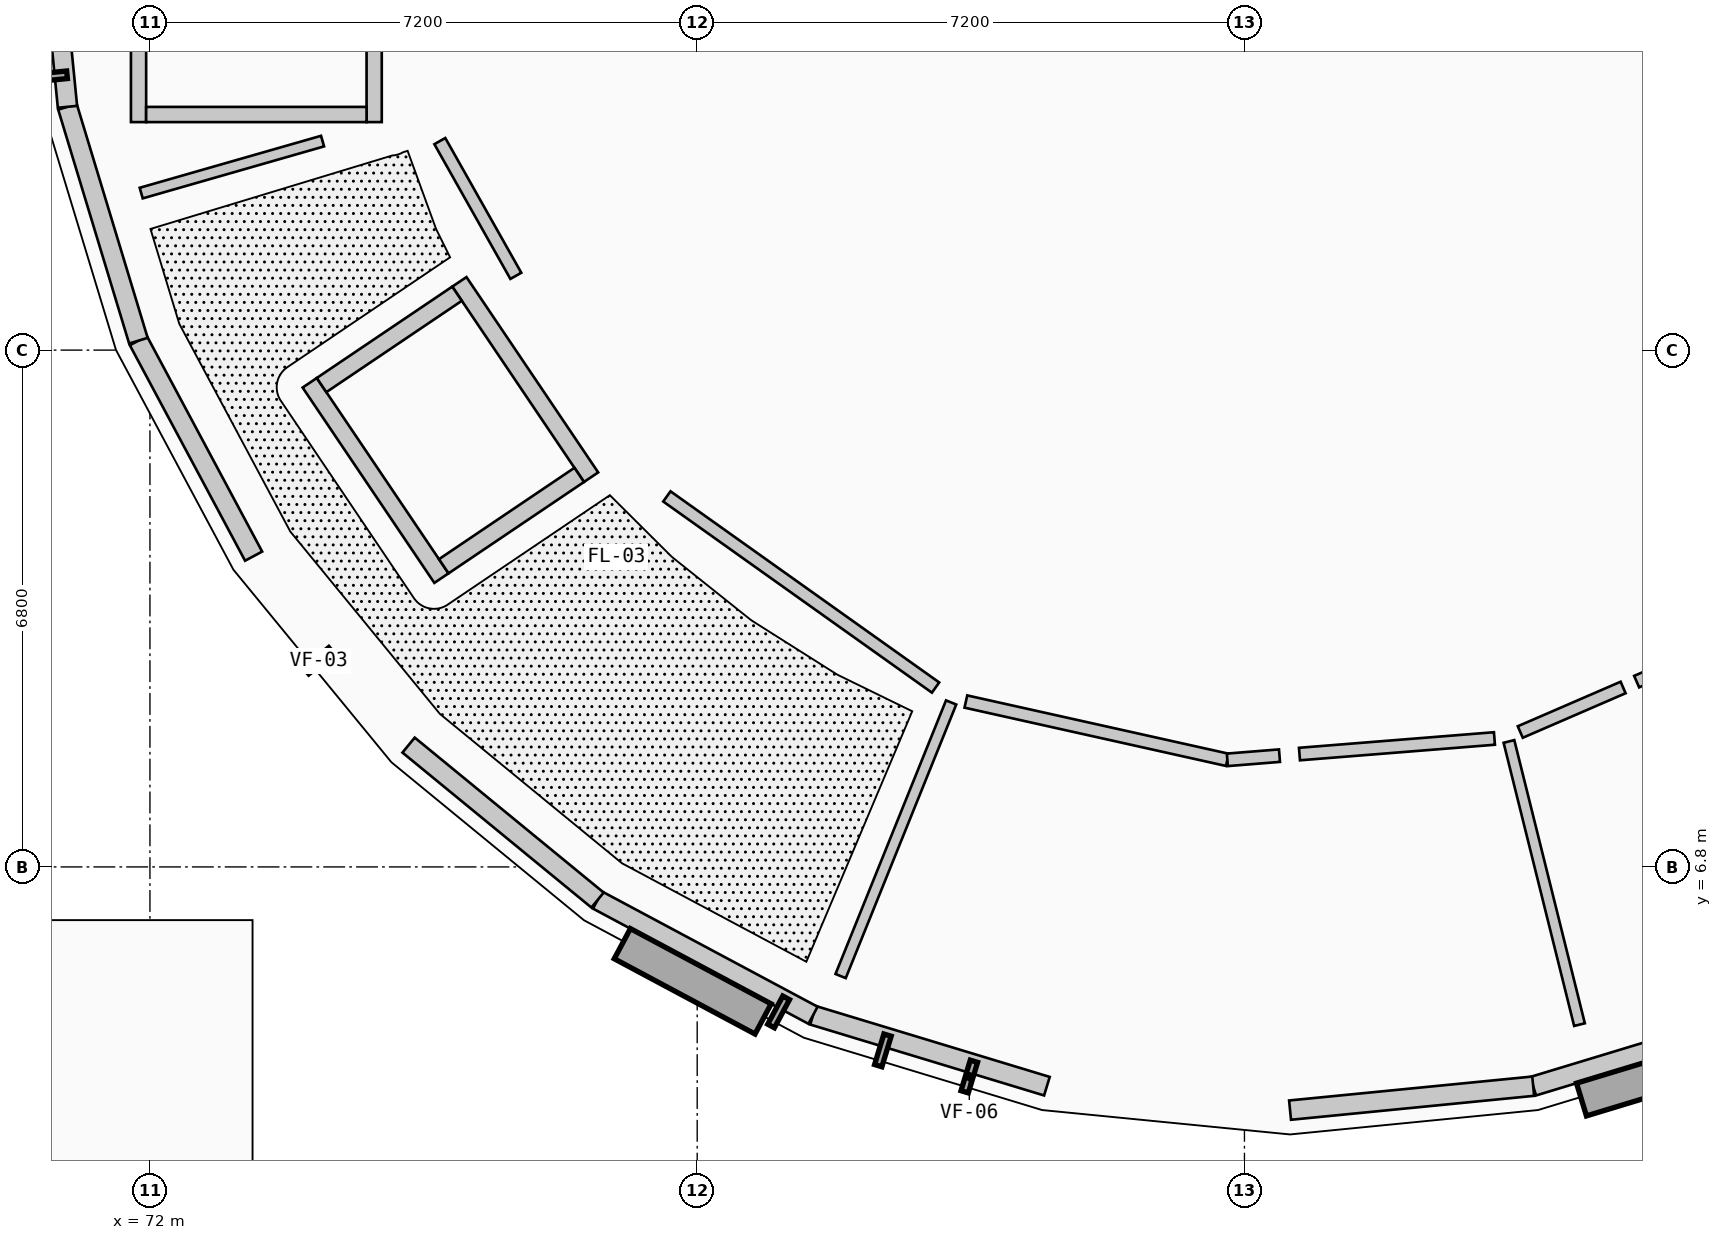
"""IFC4 building model, lengths in metres.
Left out: names, types, materials, properties, quantities, classifications, styles, units other than length and angle.
Written with IfcOpenShell. Run it as: python <this file> out.ifc"""

import sys

from ifc_helpers import new_model, si_unit, direction, frame, frame_2d, origin, origin_2d, place, context, subcontext, project, spatial, rectangle, circle, extrude, element, fill, save


model = new_model("IFC4")
c1 = context("Model", 3, precision=1e-05, world=origin(), true_north=direction((0.0, 1.0)))
c2 = subcontext(c1, "Body", "Model", "MODEL_VIEW")
j1 = project(units=[si_unit("LENGTHUNIT", "METRE"), si_unit("PLANEANGLEUNIT", "RADIAN")], contexts=[c1])
p1 = place(None, origin())
s1 = spatial("IfcSite", under=j1, at=p1, CompositionType="ELEMENT")
p2 = place(p1, origin())
s2 = spatial("IfcBuilding", under=s1, at=p2, CompositionType="ELEMENT")
p3 = place(p2, frame((0.0, 0.0, 4.55)))
s3 = spatial("IfcBuildingStorey", under=s2, at=p3, CompositionType="ELEMENT", Elevation=4.55)
for number, where, z_axis, x_axis in (
    (1, (72.329, 13.923, 0.0), (0.0, 0.0, 1.0), (1.0, 0.0, 0.0)),
    (2, (75.771, 8.771, 0.0), (0.0, 0.0, 1.0), (1.0, 0.0, 0.0)),
    (3, (80.923, 5.329, 0.0), (0.0, 0.0, 1.0), (1.0, 0.0, 0.0)),
    (4, (87.0, 4.12, 0.0), (0.0, 0.0, 1.0), (1.0, 0.0, 0.0)),
    (5, (76.08, 15.477, 0.0), (0.0, 0.0, 1.0), (1.0, 0.0, 0.0)),
    (6, (78.642, 11.642, 0.0), (0.0, 0.0, 1.0), (1.0, 0.0, 0.0)),
    (7, (82.477, 9.08, 0.0), (0.0, 0.0, 1.0), (1.0, 0.0, 0.0)),
    (8, (87.0, 8.18, 0.0), (0.0, 0.0, 1.0), (1.0, 0.0, 0.0)),
    (9, (91.523, 9.08, 0.0), (0.0, 0.0, 1.0), (1.0, 0.0, 0.0)),
):
    element("IfcColumn", number, at=place(p3, frame(where, z_axis=z_axis, x_axis=x_axis)), inside=s3, PredefinedType="COLUMN", context=c2, shape_type="SweptSolid", body=[
        extrude(rectangle(XDim=0.315, YDim=0.315, at=origin_2d()), origin(), (0.0, 0.0, 1.0), 4.2),
    ])
for number, where, z_axis, x_axis in (
    (10, (75.0, 3.25, 0.0), (0.0, 0.0, 1.0), (1.0, 0.0, 0.0)),
    (11, (79.8, 3.25, 0.0), (0.0, 0.0, 1.0), (1.0, 0.0, 0.0)),
    (12, (84.6, 3.25, 0.0), (0.0, 0.0, 1.0), (1.0, 0.0, 0.0)),
    (13, (89.4, 3.25, 0.0), (0.0, 0.0, 1.0), (1.0, 0.0, 0.0)),
):
    element("IfcColumn", number, at=place(p3, frame(where, z_axis=z_axis, x_axis=x_axis)), inside=s3, PredefinedType="COLUMN", context=c2, shape_type="SweptSolid", body=[
        extrude(circle(Radius=0.35, at=origin_2d()), origin(), (0.0, 0.0, 1.0), 4.2),
    ])
p4 = place(p3, frame((72.9, 5.65, 0.0), z_axis=(0.0, 0.0, 1.0), x_axis=(1.0, 0.0, 0.0)))
e14 = element("IfcColumn", 14, at=p4, inside=s3, PredefinedType="PILASTER", context=c2, shape_type="SweptSolid", body=[
    extrude(circle(Radius=0.275, at=origin_2d()), origin(), (0.0, 0.0, 1.0), 2.4),
])
p5 = place(p3, frame((74.166, 7.166, 0.0), z_axis=(0.0, 0.0, 1.0), x_axis=(1.0, 0.0, 0.0)))
e15 = element("IfcColumn", 15, at=p5, inside=s3, PredefinedType="COLUMN", context=c2, shape_type="SweptSolid", body=[
    extrude(circle(Radius=0.35, at=origin_2d()), origin(), (0.0, 0.0, 1.0), 4.2),
])
p6 = place(p3, frame((93.276, 4.848, 0.0), z_axis=(0.0, 0.0, 1.0), x_axis=(-0.956984161567, -0.29014016356, 0.0)))
e16 = element("IfcWall", 16, at=p6, inside=s3, PredefinedType="ELEMENTEDWALL", context=c2, shape_type="SweptSolid", body=[
    extrude(rectangle(XDim=3.215, YDim=0.255, at=frame_2d((1.607, 0.0))), origin(), (0.0, 0.0, 1.0), 3.314),
])
p7 = place(p6, frame((1.158, 0.0, 0.85)))
e17 = element("IfcOpeningElement", 17, at=p7, cuts=e16, PredefinedType="OPENING", context=c2, shape_type="SweptSolid", body=[
    extrude(rectangle(XDim=0.9, YDim=1.4, at=frame_2d((0.45, 0.7))), frame((0.0, 0.137, 0.0), z_axis=(0.0, -1.0, 0.0), x_axis=(1.0, 0.0, 0.0)), (0.0, 0.0, 1.0), 0.275),
])
p8 = place(p3, frame((90.199, 3.915, 0.0), z_axis=(0.0, 0.0, 1.0), x_axis=(-0.995188673637, -0.097977057849, 0.0)))
e18 = element("IfcWall", 18, at=p8, inside=s3, PredefinedType="ELEMENTEDWALL", context=c2, shape_type="SweptSolid", body=[
    extrude(rectangle(XDim=3.214, YDim=0.255, at=frame_2d((1.607, 0.0))), origin(), (0.0, 0.0, 1.0), 3.314),
])
p9 = place(p3, frame((83.801, 3.915, 0.0), z_axis=(0.0, 0.0, 1.0), x_axis=(-0.956984161567, 0.29014016356, 0.0)))
e19 = element("IfcWall", 19, at=p9, inside=s3, PredefinedType="ELEMENTEDWALL", context=c2, shape_type="SweptSolid", body=[
    extrude(rectangle(XDim=3.215, YDim=0.255, at=frame_2d((1.607, 0.0))), origin(), (0.0, 0.0, 1.0), 3.314),
])
p10 = place(p9, frame((1.158, 0.0, 0.85)))
e20 = element("IfcOpeningElement", 20, at=p10, cuts=e19, PredefinedType="OPENING", context=c2, shape_type="SweptSolid", body=[
    extrude(rectangle(XDim=0.9, YDim=1.65, at=frame_2d((0.45, 0.825))), frame((0.0, 0.137, 0.0), z_axis=(0.0, -1.0, 0.0), x_axis=(1.0, 0.0, 0.0)), (0.0, 0.0, 1.0), 0.275),
])
p11 = place(p3, frame((80.724, 4.848, 0.0), z_axis=(0.0, 0.0, 1.0), x_axis=(-0.881835313523, 0.47155750426, 0.0)))
e21 = element("IfcWall", 21, at=p11, inside=s3, PredefinedType="ELEMENTEDWALL", context=c2, shape_type="SweptSolid", body=[
    extrude(rectangle(XDim=3.215, YDim=0.255, at=frame_2d((1.607, 0.0))), origin(), (0.0, 0.0, 1.0), 3.314),
])
p12 = place(p11, frame((1.157, 0.0, 0.85)))
e22 = element("IfcOpeningElement", 22, at=p12, cuts=e21, PredefinedType="OPENING", context=c2, shape_type="SweptSolid", body=[
    extrude(rectangle(XDim=0.9, YDim=1.9, at=frame_2d((0.45, 0.95))), frame((0.0, 0.137, 0.0), z_axis=(0.0, -1.0, 0.0), x_axis=(1.0, 0.0, 0.0)), (0.0, 0.0, 1.0), 0.275),
])
p13 = place(p3, frame((77.889, 6.364, 0.0), z_axis=(0.0, 0.0, 1.0), x_axis=(-0.773165020866, 0.634204896314, 0.0)))
e23 = element("IfcWall", 23, at=p13, inside=s3, PredefinedType="ELEMENTEDWALL", context=c2, shape_type="SweptSolid", body=[
    extrude(rectangle(XDim=3.215, YDim=0.255, at=frame_2d((1.607, 0.0))), origin(), (0.0, 0.0, 1.0), 3.314),
])
p14 = place(p13, frame((1.148, 0.0, 0.85)))
e24 = element("IfcOpeningElement", 24, at=p14, cuts=e23, PredefinedType="OPENING", context=c2, shape_type="SweptSolid", body=[
    extrude(rectangle(XDim=0.92, YDim=1.55, at=frame_2d((0.46, 0.775))), frame((0.0, 0.137, 0.0), z_axis=(0.0, -1.0, 0.0), x_axis=(1.0, 0.0, 0.0)), (0.0, 0.0, 1.0), 0.275),
])
for number, where, z_axis, x_axis in (
    (25, (73.364, 10.889, 0.0), (0.0, 0.0, 1.0), (-0.472, 0.882, 0.0)),
    (26, (71.848, 13.724, 0.0), (0.0, 0.0, 1.0), (-0.29, 0.957, 0.0)),
):
    element("IfcWall", number, at=place(p3, frame(where, z_axis=z_axis, x_axis=x_axis)), inside=s3, PredefinedType="ELEMENTEDWALL", context=c2, shape_type="SweptSolid", body=[
        extrude(rectangle(XDim=3.215, YDim=0.255, at=frame_2d((1.607, 0.0))), origin(), (0.0, 0.0, 1.0), 3.314),
    ])
p15 = place(p3, frame((70.915, 16.801, 0.0), z_axis=(0.0, 0.0, 1.0), x_axis=(-0.097977057849, 0.995188673637, 0.0)))
e27 = element("IfcWall", 27, at=p15, inside=s3, PredefinedType="ELEMENTEDWALL", context=c2, shape_type="SweptSolid", body=[
    extrude(rectangle(XDim=3.214, YDim=0.255, at=frame_2d((1.607, 0.0))), origin(), (0.0, 0.0, 1.0), 3.314),
])
p16 = place(p3, frame((74.95, 16.6, 0.0), z_axis=(0.0, 0.0, 1.0), x_axis=(0.0, 1.0, 0.0)))
e28 = element("IfcWall", 28, at=p16, inside=s3, PredefinedType="SHEAR", context=c2, shape_type="SweptSolid", body=[
    extrude(rectangle(XDim=6.8, YDim=0.2, at=frame_2d((3.4, 0.0))), origin(), (0.0, 0.0, 1.0), 3.3),
])
p17 = place(p16, frame((0.38, 0.0, 0.0)))
e29 = element("IfcOpeningElement", 29, at=p17, cuts=e28, PredefinedType="OPENING", context=c2, shape_type="SweptSolid", body=[
    extrude(rectangle(XDim=1.1, YDim=2.15, at=frame_2d((0.55, 1.075))), frame((0.0, 0.11, 0.0), z_axis=(0.0, -1.0, 0.0), x_axis=(1.0, 0.0, 0.0)), (0.0, 0.0, 1.0), 0.22),
])
p18 = place(p3, frame((71.85, 16.6, 0.0), z_axis=(0.0, 0.0, 1.0), x_axis=(0.0, 1.0, 0.0)))
e30 = element("IfcWall", 30, at=p18, inside=s3, PredefinedType="SHEAR", context=c2, shape_type="SweptSolid", body=[
    extrude(rectangle(XDim=6.8, YDim=0.2, at=frame_2d((3.4, 0.0))), origin(), (0.0, 0.0, 1.0), 3.3),
])
p19 = place(p3, frame((74.85, 16.7, 0.0), z_axis=(0.0, 0.0, 1.0), x_axis=(-1.0, 0.0, 0.0)))
e31 = element("IfcWall", 31, at=p19, inside=s3, PredefinedType="SHEAR", context=c2, shape_type="SweptSolid", body=[
    extrude(rectangle(XDim=2.9, YDim=0.2, at=frame_2d((1.45, 0.0))), origin(), (0.0, 0.0, 1.0), 3.3),
])
p20 = place(p3, frame((77.804, 11.928, 0.0), z_axis=(0.0, 0.0, 1.0), x_axis=(-0.559054792443, 0.829130712883, 0.0)))
e32 = element("IfcWall", 32, at=p20, inside=s3, PredefinedType="SHEAR", context=c2, shape_type="SweptSolid", body=[
    extrude(rectangle(XDim=3.1, YDim=0.225, at=frame_2d((1.55, 0.0))), origin(), (0.0, 0.0, 1.0), 3.3),
])
p21 = place(p20, frame((0.9, 0.0, 0.0)))
e33 = element("IfcOpeningElement", 33, at=p21, cuts=e32, PredefinedType="OPENING", context=c2, shape_type="SweptSolid", body=[
    extrude(rectangle(XDim=1.3, YDim=2.2, at=frame_2d((0.65, 1.1))), frame((0.0, 0.123, 0.0), z_axis=(0.0, -1.0, 0.0), x_axis=(1.0, 0.0, 0.0)), (0.0, 0.0, 1.0), 0.245),
])
p22 = place(p3, frame((75.835, 10.6, 0.0), z_axis=(0.0, 0.0, 1.0), x_axis=(-0.559091302934, 0.829106093925, 0.0)))
e34 = element("IfcWall", 34, at=p22, inside=s3, PredefinedType="SHEAR", context=c2, shape_type="SweptSolid", body=[
    extrude(rectangle(XDim=3.1, YDim=0.225, at=frame_2d((1.55, 0.0))), origin(), (0.0, 0.0, 1.0), 3.3),
])
p23 = place(p3, frame((77.648, 11.958, 0.0), z_axis=(0.0, 0.0, 1.0), x_axis=(-0.829050086962, -0.559174349652, 0.0)))
e35 = element("IfcWall", 35, at=p23, inside=s3, PredefinedType="SHEAR", context=c2, shape_type="SweptSolid", body=[
    extrude(rectangle(XDim=2.149, YDim=0.225, at=frame_2d((1.075, 0.0))), origin(), (0.0, 0.0, 1.0), 3.3),
])
p24 = place(p3, frame((76.04, 14.342, 0.0), z_axis=(0.0, 0.0, 1.0), x_axis=(-0.828997430928, -0.559252411274, 0.0)))
e36 = element("IfcWall", 36, at=p24, inside=s3, PredefinedType="SHEAR", context=c2, shape_type="SweptSolid", body=[
    extrude(rectangle(XDim=2.15, YDim=0.225, at=frame_2d((1.075, 0.0))), origin(), (0.0, 0.0, 1.0), 3.3),
])
p25 = place(p3, frame((74.271, 16.35, 0.0), z_axis=(0.0, 0.0, 1.0), x_axis=(-0.96127114667, -0.275604395065, 0.0)))
e37 = element("IfcWall", 37, at=p25, inside=s3, PredefinedType="PARTITIONING", context=c2, shape_type="SweptSolid", body=[
    extrude(rectangle(XDim=2.482, YDim=0.145, at=frame_2d((1.241, 0.0))), origin(), (0.0, 0.0, 1.0), 3.3),
])
p26 = place(p3, frame((82.541, 8.964, 0.0), z_axis=(0.0, 0.0, 1.0), x_axis=(-0.374510873584, -0.927222522142, 0.0)))
e38 = element("IfcWall", 38, at=p26, inside=s3, PredefinedType="PARTITIONING", context=c2, shape_type="SweptSolid", body=[
    extrude(rectangle(XDim=3.883, YDim=0.145, at=frame_2d((1.941, 0.0))), origin(), (0.0, 0.0, 1.0), 3.3),
])
p27 = place(p3, frame((89.88, 8.451, 0.0), z_axis=(0.0, 0.0, 1.0), x_axis=(0.241742626418, -0.970340405514, 0.0)))
e39 = element("IfcWall", 39, at=p27, inside=s3, PredefinedType="PARTITIONING", context=c2, shape_type="SweptSolid", body=[
    extrude(rectangle(XDim=3.84, YDim=0.145, at=frame_2d((1.92, 0.0))), origin(), (0.0, 0.0, 1.0), 3.3),
])
p28 = place(p3, frame((75.814, 16.35, 0.0), z_axis=(0.0, 0.0, 1.0), x_axis=(0.491223208107, -0.871033730585, 0.0)))
e40 = element("IfcWall", 40, at=p28, inside=s3, PredefinedType="PARTITIONING", context=c2, shape_type="SweptSolid", body=[
    extrude(rectangle(XDim=2.036, YDim=0.165, at=frame_2d((1.018, 0.0))), origin(), (0.0, 0.0, 1.0), 3.3),
])
p29 = place(p3, frame((78.801, 11.675, 0.0), z_axis=(0.0, 0.0, 1.0), x_axis=(0.814800554092, -0.57974137083, 0.0)))
e41 = element("IfcWall", 41, at=p29, inside=s3, PredefinedType="PARTITIONING", context=c2, shape_type="SweptSolid", body=[
    extrude(rectangle(XDim=4.338, YDim=0.165, at=frame_2d((2.169, 0.0))), origin(), (0.0, 0.0, 1.0), 3.3),
])
p30 = place(p29, frame((1.599, 0.0, 0.0)))
e42 = element("IfcOpeningElement", 42, at=p30, cuts=e41, PredefinedType="OPENING", context=c2, shape_type="SweptSolid", body=[
    extrude(rectangle(XDim=1.14, YDim=2.28, at=frame_2d((0.57, 1.14))), frame((0.0, 0.093, 0.0), z_axis=(0.0, -1.0, 0.0), x_axis=(1.0, 0.0, 0.0)), (0.0, 0.0, 1.0), 0.185),
])
p31 = place(p3, frame((82.735, 8.976, 0.0), z_axis=(0.0, 0.0, 1.0), x_axis=(0.976027064995, -0.21764918653, 0.0)))
e43 = element("IfcWall", 43, at=p31, inside=s3, PredefinedType="PARTITIONING", context=c2, shape_type="SweptSolid", body=[
    extrude(rectangle(XDim=3.524, YDim=0.165, at=frame_2d((1.762, 0.0))), origin(), (0.0, 0.0, 1.0), 3.3),
])
p32 = place(p31, frame((1.132, 0.0, 0.0)))
e44 = element("IfcOpeningElement", 44, at=p32, cuts=e43, PredefinedType="OPENING", context=c2, shape_type="SweptSolid", body=[
    extrude(rectangle(XDim=1.26, YDim=2.28, at=frame_2d((0.63, 1.14))), frame((0.0, 0.093, 0.0), z_axis=(0.0, -1.0, 0.0), x_axis=(1.0, 0.0, 0.0)), (0.0, 0.0, 1.0), 0.185),
])
p33 = place(p3, frame((86.175, 8.209, 0.0), z_axis=(0.0, 0.0, 1.0), x_axis=(0.996809636353, 0.079815718213, 0.0)))
e45 = element("IfcWall", 45, at=p33, inside=s3, PredefinedType="PARTITIONING", context=c2, shape_type="SweptSolid", body=[
    extrude(rectangle(XDim=0.688, YDim=0.165, at=frame_2d((0.344, 0.0))), origin(), (0.0, 0.0, 1.0), 3.3),
])
p34 = place(p3, frame((87.124, 8.285, 0.0), z_axis=(0.0, 0.0, 1.0), x_axis=(0.996818897766, 0.079699968982, 0.0)))
e46 = element("IfcWall", 46, at=p34, inside=s3, PredefinedType="PARTITIONING", context=c2, shape_type="SweptSolid", body=[
    extrude(rectangle(XDim=2.573, YDim=0.165, at=frame_2d((1.287, 0.0))), origin(), (0.0, 0.0, 1.0), 3.3),
])
p35 = place(p3, frame((90.029, 8.575, 0.0), z_axis=(0.0, 0.0, 1.0), x_axis=(0.917648226471, 0.397393674401, 0.0)))
e47 = element("IfcWall", 47, at=p35, inside=s3, PredefinedType="PARTITIONING", context=c2, shape_type="SweptSolid", body=[
    extrude(rectangle(XDim=1.474, YDim=0.165, at=frame_2d((0.737, 0.0))), origin(), (0.0, 0.0, 1.0), 3.3),
])
p36 = place(p35, frame((0.282, 0.0, 0.0)))
e48 = element("IfcOpeningElement", 48, at=p36, cuts=e47, PredefinedType="OPENING", context=c2, shape_type="SweptSolid", body=[
    extrude(rectangle(XDim=0.91, YDim=2.15, at=frame_2d((0.455, 1.075))), frame((0.0, 0.093, 0.0), z_axis=(0.0, -1.0, 0.0), x_axis=(1.0, 0.0, 0.0)), (0.0, 0.0, 1.0), 0.185),
])
p37 = place(p3, frame((91.56, 9.238, 0.0), z_axis=(0.0, 0.0, 1.0), x_axis=(0.917614776026, 0.397470908142, 0.0)))
e49 = element("IfcWall", 49, at=p37, inside=s3, PredefinedType="PARTITIONING", context=c2, shape_type="SweptSolid", body=[
    extrude(rectangle(XDim=1.857, YDim=0.165, at=frame_2d((0.928, 0.0))), origin(), (0.0, 0.0, 1.0), 3.3),
])
p38 = place(p7, origin())
e50 = element("IfcWindow", 50, at=p38, inside=s3, PartitioningType="SINGLE_PANEL", PredefinedType="WINDOW", context=c2, shape_type="SweptSolid", body=[
    extrude(rectangle(XDim=0.9, YDim=1.4, at=frame_2d((0.45, 0.7))), frame((0.0, 0.03, 0.0), z_axis=(0.0, -1.0, 0.0), x_axis=(1.0, 0.0, 0.0)), (0.0, 0.0, 1.0), 0.06),
])
fill(e17, e50)
p39 = place(p10, origin())
e51 = element("IfcWindow", 51, at=p39, inside=s3, PartitioningType="SINGLE_PANEL", PredefinedType="WINDOW", context=c2, shape_type="SweptSolid", body=[
    extrude(rectangle(XDim=0.9, YDim=1.65, at=frame_2d((0.45, 0.825))), frame((0.0, 0.03, 0.0), z_axis=(0.0, -1.0, 0.0), x_axis=(1.0, 0.0, 0.0)), (0.0, 0.0, 1.0), 0.06),
])
fill(e20, e51)
p40 = place(p12, origin())
e52 = element("IfcWindow", 52, at=p40, inside=s3, PartitioningType="SINGLE_PANEL", PredefinedType="WINDOW", context=c2, shape_type="SweptSolid", body=[
    extrude(rectangle(XDim=0.9, YDim=1.9, at=frame_2d((0.45, 0.95))), frame((0.0, 0.03, 0.0), z_axis=(0.0, -1.0, 0.0), x_axis=(1.0, 0.0, 0.0)), (0.0, 0.0, 1.0), 0.06),
])
fill(e22, e52)
p41 = place(p14, origin())
e53 = element("IfcWindow", 53, at=p41, inside=s3, PartitioningType="SINGLE_PANEL", PredefinedType="WINDOW", context=c2, shape_type="SweptSolid", body=[
    extrude(rectangle(XDim=0.92, YDim=1.55, at=frame_2d((0.46, 0.775))), frame((0.0, 0.03, 0.0), z_axis=(0.0, -1.0, 0.0), x_axis=(1.0, 0.0, 0.0)), (0.0, 0.0, 1.0), 0.06),
])
fill(e24, e53)
p42 = place(p17, origin())
e54 = element("IfcDoor", 54, at=p42, inside=s3, OperationType="SINGLE_SWING_LEFT", PredefinedType="DOOR", context=c2, shape_type="SweptSolid", body=[
    extrude(rectangle(XDim=1.1, YDim=2.15, at=frame_2d((0.55, 1.075))), frame((0.0, 0.025, 0.0), z_axis=(0.0, -1.0, 0.0), x_axis=(1.0, 0.0, 0.0)), (0.0, 0.0, 1.0), 0.05),
])
fill(e29, e54)
p43 = place(p21, origin())
e55 = element("IfcDoor", 55, at=p43, inside=s3, OperationType="DOUBLE_DOOR_SLIDING", PredefinedType="DOOR", context=c2, shape_type="SweptSolid", body=[
    extrude(rectangle(XDim=1.3, YDim=2.2, at=frame_2d((0.65, 1.1))), frame((0.0, 0.025, 0.0), z_axis=(0.0, -1.0, 0.0), x_axis=(1.0, 0.0, 0.0)), (0.0, 0.0, 1.0), 0.05),
])
fill(e33, e55)
p44 = place(p30, origin())
e56 = element("IfcDoor", 56, at=p44, inside=s3, OperationType="SINGLE_SWING_RIGHT", PredefinedType="DOOR", context=c2, shape_type="SweptSolid", body=[
    extrude(rectangle(XDim=1.14, YDim=2.28, at=frame_2d((0.57, 1.14))), frame((0.0, 0.025, 0.0), z_axis=(0.0, -1.0, 0.0), x_axis=(1.0, 0.0, 0.0)), (0.0, 0.0, 1.0), 0.05),
])
fill(e42, e56)
p45 = place(p32, origin())
e57 = element("IfcDoor", 57, at=p45, inside=s3, OperationType="SINGLE_SWING_LEFT", PredefinedType="DOOR", context=c2, shape_type="SweptSolid", body=[
    extrude(rectangle(XDim=1.26, YDim=2.28, at=frame_2d((0.63, 1.14))), frame((0.0, 0.025, 0.0), z_axis=(0.0, -1.0, 0.0), x_axis=(1.0, 0.0, 0.0)), (0.0, 0.0, 1.0), 0.05),
])
fill(e44, e57)
p46 = place(p36, origin())
e58 = element("IfcDoor", 58, at=p46, inside=s3, OperationType="SINGLE_SWING_RIGHT", PredefinedType="DOOR", context=c2, shape_type="SweptSolid", body=[
    extrude(rectangle(XDim=0.91, YDim=2.15, at=frame_2d((0.455, 1.075))), frame((0.0, 0.025, 0.0), z_axis=(0.0, -1.0, 0.0), x_axis=(1.0, 0.0, 0.0)), (0.0, 0.0, 1.0), 0.05),
])
fill(e48, e58)
save(model, sys.argv[1])
